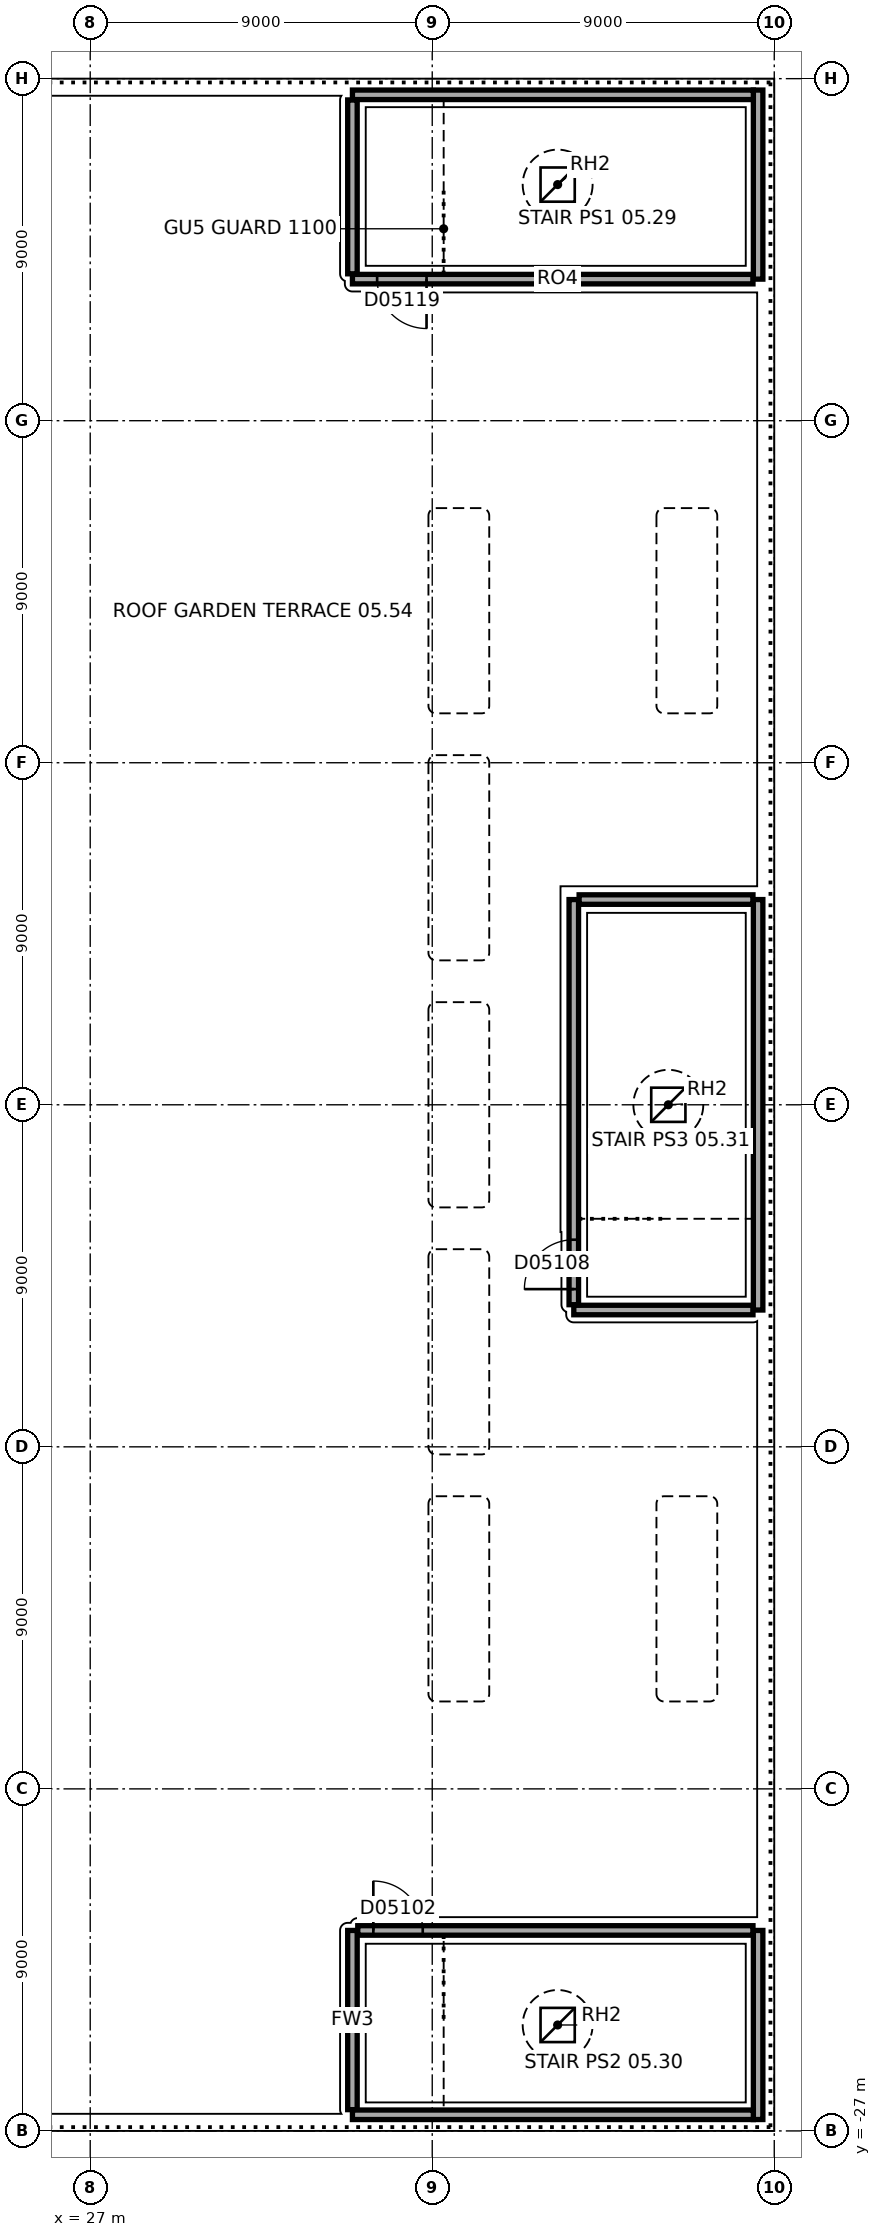
"""IFC4 building model, lengths in metres.
Left out: names, types, materials, properties, quantities, classifications, styles, units other than length and angle.
Written with IfcOpenShell. Run it as: python <this file> out.ifc"""

import sys

from ifc_helpers import new_model, si_unit, direction, frame, frame_2d, origin, origin_2d, place, context, subcontext, project, spatial, rectangle, extrude, element, fill, save


model = new_model("IFC4")
c1 = context("Model", 3, precision=1e-05, world=origin(), true_north=direction((0.0, 1.0)))
c2 = subcontext(c1, "Body", "Model", "MODEL_VIEW")
j1 = project(units=[si_unit("LENGTHUNIT", "METRE"), si_unit("PLANEANGLEUNIT", "RADIAN")], contexts=[c1])
p1 = place(None, origin())
s1 = spatial("IfcSite", under=j1, at=p1, CompositionType="ELEMENT")
p2 = place(p1, origin())
s2 = spatial("IfcBuilding", under=s1, at=p2, CompositionType="ELEMENT")
p3 = place(p2, frame((0.0, 0.0, 34.5)))
s3 = spatial("IfcBuildingStorey", under=s2, at=p3, CompositionType="ELEMENT", Elevation=34.5)
p4 = place(p3, frame((33.9, -26.44, 0.0), z_axis=(0.0, 0.0, 1.0), x_axis=(0.0, 1.0, 0.0)))
e1 = element("IfcWall", 1, at=p4, inside=s3, PredefinedType="SOLIDWALL", context=c2, shape_type="SweptSolid", body=[
    extrude(rectangle(XDim=4.715, YDim=0.25, at=frame_2d((2.357, 0.0))), origin(), (0.0, 0.0, 1.0), 4.2),
])
p5 = place(p3, frame((34.04, -21.725, 0.0), z_axis=(0.0, 0.0, 1.0), x_axis=(1.0, 0.0, 0.0)))
e2 = element("IfcWall", 2, at=p5, inside=s3, PredefinedType="SOLIDWALL", context=c2, shape_type="SweptSolid", body=[
    extrude(rectangle(XDim=10.4, YDim=0.25, at=frame_2d((5.2, 0.0))), origin(), (0.0, 0.0, 1.0), 4.2),
])
p6 = place(p5, frame((0.41, 0.0, 0.0)))
e3 = element("IfcOpeningElement", 3, at=p6, cuts=e2, PredefinedType="OPENING", context=c2, shape_type="SweptSolid", body=[
    extrude(rectangle(XDim=1.3, YDim=2.1, at=frame_2d((0.65, 1.05))), frame((0.0, 0.135, 0.0), z_axis=(0.0, -1.0, 0.0), x_axis=(1.0, 0.0, 0.0)), (0.0, 0.0, 1.0), 0.27),
])
p7 = place(p3, frame((44.44, -5.4, 0.0), z_axis=(0.0, 0.0, 1.0), x_axis=(-1.0, 0.0, 0.0)))
e4 = element("IfcWall", 4, at=p7, inside=s3, PredefinedType="SOLIDWALL", context=c2, shape_type="SweptSolid", body=[
    extrude(rectangle(XDim=4.715, YDim=0.25, at=frame_2d((2.357, 0.0))), origin(), (0.0, 0.0, 1.0), 4.2),
])
p8 = place(p3, frame((39.725, -5.26, 0.0), z_axis=(0.0, 0.0, 1.0), x_axis=(0.0, 1.0, 0.0)))
e5 = element("IfcWall", 5, at=p8, inside=s3, PredefinedType="SOLIDWALL", context=c2, shape_type="SweptSolid", body=[
    extrude(rectangle(XDim=10.66, YDim=0.25, at=frame_2d((5.33, 0.0))), origin(), (0.0, 0.0, 1.0), 4.2),
])
p9 = place(p8, frame((0.41, 0.0, 0.0)))
e6 = element("IfcOpeningElement", 6, at=p9, cuts=e5, PredefinedType="OPENING", context=c2, shape_type="SweptSolid", body=[
    extrude(rectangle(XDim=1.3, YDim=2.1, at=frame_2d((0.65, 1.05))), frame((0.0, 0.135, 0.0), z_axis=(0.0, -1.0, 0.0), x_axis=(1.0, 0.0, 0.0)), (0.0, 0.0, 1.0), 0.27),
])
p10 = place(p3, frame((39.865, 5.4, 0.0), z_axis=(0.0, 0.0, 1.0), x_axis=(1.0, 0.0, 0.0)))
e7 = element("IfcWall", 7, at=p10, inside=s3, PredefinedType="SOLIDWALL", context=c2, shape_type="SweptSolid", body=[
    extrude(rectangle(XDim=4.575, YDim=0.25, at=frame_2d((2.288, 0.0))), origin(), (0.0, 0.0, 1.0), 4.2),
])
p11 = place(p3, frame((44.44, 21.725, 0.0), z_axis=(0.0, 0.0, 1.0), x_axis=(-1.0, 0.0, 0.0)))
e8 = element("IfcWall", 8, at=p11, inside=s3, PredefinedType="SOLIDWALL", context=c2, shape_type="SweptSolid", body=[
    extrude(rectangle(XDim=10.54, YDim=0.25, at=frame_2d((5.27, 0.0))), origin(), (0.0, 0.0, 1.0), 4.2),
])
p12 = place(p11, frame((8.59, 0.0, 0.0)))
e9 = element("IfcOpeningElement", 9, at=p12, cuts=e8, PredefinedType="OPENING", context=c2, shape_type="SweptSolid", body=[
    extrude(rectangle(XDim=1.3, YDim=2.1, at=frame_2d((0.65, 1.05))), frame((0.0, 0.135, 0.0), z_axis=(0.0, -1.0, 0.0), x_axis=(1.0, 0.0, 0.0)), (0.0, 0.0, 1.0), 0.27),
])
p13 = place(p3, frame((33.9, 21.865, 0.0), z_axis=(0.0, 0.0, 1.0), x_axis=(0.0, 1.0, 0.0)))
e10 = element("IfcWall", 10, at=p13, inside=s3, PredefinedType="SOLIDWALL", context=c2, shape_type="SweptSolid", body=[
    extrude(rectangle(XDim=4.575, YDim=0.25, at=frame_2d((2.288, 0.0))), origin(), (0.0, 0.0, 1.0), 4.2),
])
p14 = place(p3, frame((44.575, 21.725, 0.0), z_axis=(0.0, 0.0, 1.0), x_axis=(0.0, 1.0, 0.0)))
e11 = element("IfcWall", 11, at=p14, inside=s3, PredefinedType="SOLIDWALL", context=c2, shape_type="SweptSolid", body=[
    extrude(rectangle(XDim=4.975, YDim=0.25, at=frame_2d((2.487, 0.0))), origin(), (0.0, 0.0, 1.0), 4.2),
])
p15 = place(p3, frame((44.45, 26.575, 0.0), z_axis=(0.0, 0.0, 1.0), x_axis=(-1.0, 0.0, 0.0)))
e12 = element("IfcWall", 12, at=p15, inside=s3, PredefinedType="SOLIDWALL", context=c2, shape_type="SweptSolid", body=[
    extrude(rectangle(XDim=10.55, YDim=0.25, at=frame_2d((5.275, 0.0))), origin(), (0.0, 0.0, 1.0), 4.2),
])
p16 = place(p3, frame((44.575, -21.725, 0.0), z_axis=(0.0, 0.0, 1.0), x_axis=(0.0, -1.0, 0.0)))
e13 = element("IfcWall", 13, at=p16, inside=s3, PredefinedType="SOLIDWALL", context=c2, shape_type="SweptSolid", body=[
    extrude(rectangle(XDim=4.975, YDim=0.25, at=frame_2d((2.487, 0.0))), origin(), (0.0, 0.0, 1.0), 4.2),
])
p17 = place(p3, frame((44.45, -26.575, 0.0), z_axis=(0.0, 0.0, 1.0), x_axis=(-1.0, 0.0, 0.0)))
e14 = element("IfcWall", 14, at=p17, inside=s3, PredefinedType="SOLIDWALL", context=c2, shape_type="SweptSolid", body=[
    extrude(rectangle(XDim=10.55, YDim=0.25, at=frame_2d((5.275, 0.0))), origin(), (0.0, 0.0, 1.0), 4.2),
])
p18 = place(p3, frame((44.575, 5.4, 0.0), z_axis=(0.0, 0.0, 1.0), x_axis=(0.0, -1.0, 0.0)))
e15 = element("IfcWall", 15, at=p18, inside=s3, PredefinedType="SOLIDWALL", context=c2, shape_type="SweptSolid", body=[
    extrude(rectangle(XDim=10.8, YDim=0.25, at=frame_2d((5.4, 0.0))), origin(), (0.0, 0.0, 1.0), 4.2),
])
p19 = place(p6, origin())
e16 = element("IfcDoor", 16, at=p19, inside=s3, OperationType="SINGLE_SWING_LEFT", PredefinedType="DOOR", context=c2, shape_type="SweptSolid", body=[
    extrude(rectangle(XDim=1.3, YDim=2.1, at=frame_2d((0.65, 1.05))), frame((0.0, 0.025, 0.0), z_axis=(0.0, -1.0, 0.0), x_axis=(1.0, 0.0, 0.0)), (0.0, 0.0, 1.0), 0.05),
])
fill(e3, e16)
p20 = place(p9, origin())
e17 = element("IfcDoor", 17, at=p20, inside=s3, OperationType="SINGLE_SWING_LEFT", PredefinedType="DOOR", context=c2, shape_type="SweptSolid", body=[
    extrude(rectangle(XDim=1.3, YDim=2.1, at=frame_2d((0.65, 1.05))), frame((0.0, 0.025, 0.0), z_axis=(0.0, -1.0, 0.0), x_axis=(1.0, 0.0, 0.0)), (0.0, 0.0, 1.0), 0.05),
])
fill(e6, e17)
p21 = place(p12, origin())
e18 = element("IfcDoor", 18, at=p21, inside=s3, OperationType="SINGLE_SWING_LEFT", PredefinedType="DOOR", context=c2, shape_type="SweptSolid", body=[
    extrude(rectangle(XDim=1.3, YDim=2.1, at=frame_2d((0.65, 1.05))), frame((0.0, 0.025, 0.0), z_axis=(0.0, -1.0, 0.0), x_axis=(1.0, 0.0, 0.0)), (0.0, 0.0, 1.0), 0.05),
])
fill(e9, e18)
p22 = place(p3, frame((0.0, 0.0, 3.95)))
p23 = place(p22, frame((39.3, 24.212, -0.01)))
p24 = place(p23, frame((0.0, 0.0, 0.21)))
e19 = element("IfcWindow", 19, at=p24, inside=s3, PartitioningType="SINGLE_PANEL", PredefinedType="SKYLIGHT", context=c2, shape_type="SweptSolid", body=[
    extrude(rectangle(XDim=0.9, YDim=0.9, at=origin_2d()), origin(), (0.0, 0.0, 1.0), 0.05),
])
p25 = place(p3, frame((0.0, 0.0, 3.95)))
p26 = place(p25, frame((39.3, -24.212, -0.01)))
p27 = place(p26, frame((0.0, 0.0, 0.21)))
e20 = element("IfcWindow", 20, at=p27, inside=s3, PartitioningType="SINGLE_PANEL", PredefinedType="SKYLIGHT", context=c2, shape_type="SweptSolid", body=[
    extrude(rectangle(XDim=0.9, YDim=0.9, at=origin_2d()), origin(), (0.0, 0.0, 1.0), 0.05),
])
p28 = place(p3, frame((0.0, 0.0, 3.95)))
p29 = place(p28, frame((42.212, 0.0, -0.01)))
p30 = place(p29, frame((0.0, 0.0, 0.21)))
e21 = element("IfcWindow", 21, at=p30, inside=s3, PartitioningType="SINGLE_PANEL", PredefinedType="SKYLIGHT", context=c2, shape_type="SweptSolid", body=[
    extrude(rectangle(XDim=0.9, YDim=0.9, at=origin_2d()), origin(), (0.0, 0.0, 1.0), 0.05),
])
save(model, sys.argv[1])
